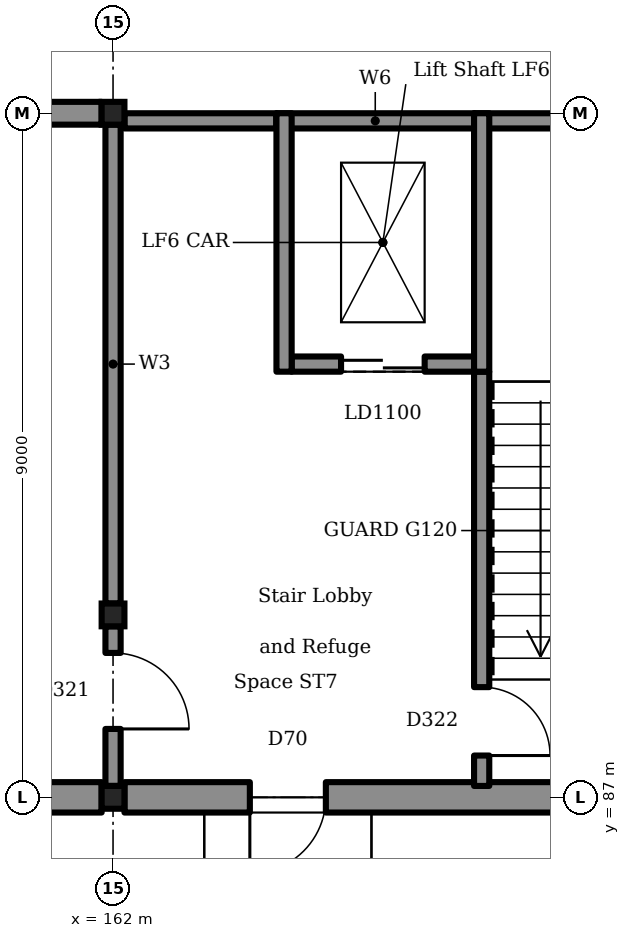
"""IFC4 building model, lengths in metres.
Left out: names, types, materials, properties, quantities, classifications, styles, units other than length and angle.
Written with IfcOpenShell. Run it as: python <this file> out.ifc"""

import sys

from ifc_helpers import new_model, si_unit, direction, frame, frame_2d, origin, origin_2d, place, context, subcontext, project, spatial, rectangle, i_section, extrude, element, fill, save


model = new_model("IFC4")
c1 = context("Model", 3, precision=1e-05, world=origin(), true_north=direction((0.0, 1.0)))
c2 = subcontext(c1, "Body", "Model", "MODEL_VIEW")
j1 = project(units=[si_unit("LENGTHUNIT", "METRE"), si_unit("PLANEANGLEUNIT", "RADIAN")], contexts=[c1])
p1 = place(None, origin())
s1 = spatial("IfcSite", under=j1, at=p1, CompositionType="ELEMENT")
p2 = place(p1, origin())
s2 = spatial("IfcBuilding", under=s1, at=p2, CompositionType="ELEMENT")
p3 = place(p2, origin())
s3 = spatial("IfcBuildingStorey", under=s2, at=p3, CompositionType="ELEMENT", Elevation=0.0)
for number, where, z_axis, x_axis in (
    (1, (162.0, 87.0, 0.0), (0.0, 0.0, 1.0), (1.0, 0.0, 0.0)),
    (2, (162.0, 96.0, 0.0), (0.0, 0.0, 1.0), (1.0, 0.0, 0.0)),
    (3, (162.0, 89.4, 0.0), (0.0, 0.0, 1.0), (1.0, 0.0, 0.0)),
):
    element("IfcColumn", number, at=place(p3, frame(where, z_axis=z_axis, x_axis=x_axis)), inside=s3, PredefinedType="COLUMN", context=c2, shape_type="SweptSolid", body=[
        extrude(i_section(OverallWidth=0.3, OverallDepth=0.3, WebThickness=0.011, FlangeThickness=0.019, FilletRadius=0.027, at=origin_2d()), origin(), (0.0, 0.0, 1.0), 5.4),
    ])
p4 = place(p3, frame((154.15, 87.0, 0.0), z_axis=(0.0, 0.0, 1.0), x_axis=(1.0, 0.0, 0.0)))
e4 = element("IfcWall", 4, at=p4, inside=s3, PredefinedType="SOLIDWALL", context=c2, shape_type="SweptSolid", body=[
    extrude(rectangle(XDim=7.7, YDim=0.4, at=frame_2d((3.85, 0.0))), origin(), (0.0, 0.0, 1.0), 5.15),
])
p5 = place(p3, frame((162.15, 87.0, 0.0), z_axis=(0.0, 0.0, 1.0), x_axis=(1.0, 0.0, 0.0)))
e5 = element("IfcWall", 5, at=p5, inside=s3, PredefinedType="SOLIDWALL", context=c2, shape_type="SweptSolid", body=[
    extrude(rectangle(XDim=7.7, YDim=0.4, at=frame_2d((3.85, 0.0))), origin(), (0.0, 0.0, 1.0), 5.15),
])
p6 = place(p5, frame((1.65, 0.0, 0.0)))
e6 = element("IfcOpeningElement", 6, at=p6, cuts=e5, PredefinedType="OPENING", context=c2, shape_type="SweptSolid", body=[
    extrude(rectangle(XDim=1.0, YDim=2.1, at=frame_2d((0.5, 1.05))), frame((0.0, 0.21, 0.0), z_axis=(0.0, -1.0, 0.0), x_axis=(1.0, 0.0, 0.0)), (0.0, 0.0, 1.0), 0.42),
])
p7 = place(p3, frame((160.0, 96.0, 0.0), z_axis=(0.0, 0.0, 1.0), x_axis=(1.0, 0.0, 0.0)))
e7 = element("IfcWall", 7, at=p7, inside=s3, PredefinedType="SOLIDWALL", context=c2, shape_type="SweptSolid", body=[
    extrude(rectangle(XDim=1.85, YDim=0.3, at=frame_2d((0.925, 0.0))), origin(), (0.0, 0.0, 1.0), 6.0),
])
p8 = place(p3, frame((162.0, 87.15, 0.0), z_axis=(0.0, 0.0, 1.0), x_axis=(0.0, 1.0, 0.0)))
e8 = element("IfcWall", 8, at=p8, inside=s3, PredefinedType="SOLIDWALL", context=c2, shape_type="SweptSolid", body=[
    extrude(rectangle(XDim=2.1, YDim=0.2, at=frame_2d((1.05, 0.0))), origin(), (0.0, 0.0, 1.0), 5.15),
])
p9 = place(p8, frame((0.75, 0.0, 0.0)))
e9 = element("IfcOpeningElement", 9, at=p9, cuts=e8, PredefinedType="OPENING", context=c2, shape_type="SweptSolid", body=[
    extrude(rectangle(XDim=1.0, YDim=2.1, at=frame_2d((0.5, 1.05))), frame((0.0, 0.11, 0.0), z_axis=(0.0, -1.0, 0.0), x_axis=(1.0, 0.0, 0.0)), (0.0, 0.0, 1.0), 0.22),
])
p10 = place(p3, frame((162.0, 89.55, 0.0), z_axis=(0.0, 0.0, 1.0), x_axis=(0.0, 1.0, 0.0)))
e10 = element("IfcWall", 10, at=p10, inside=s3, PredefinedType="SOLIDWALL", context=c2, shape_type="SweptSolid", body=[
    extrude(rectangle(XDim=6.3, YDim=0.2, at=frame_2d((3.15, 0.0))), origin(), (0.0, 0.0, 1.0), 5.15),
])
p11 = place(p3, frame((162.15, 95.9, 0.0), z_axis=(0.0, 0.0, 1.0), x_axis=(1.0, 0.0, 0.0)))
e11 = element("IfcWall", 11, at=p11, inside=s3, PredefinedType="SOLIDWALL", context=c2, shape_type="SweptSolid", body=[
    extrude(rectangle(XDim=2.0, YDim=0.2, at=frame_2d((1.0, 0.0))), origin(), (0.0, 0.0, 1.0), 5.15),
])
p12 = place(p3, frame((166.75, 95.9, 0.0), z_axis=(0.0, 0.0, 1.0), x_axis=(1.0, 0.0, 0.0)))
e12 = element("IfcWall", 12, at=p12, inside=s3, PredefinedType="SOLIDWALL", context=c2, shape_type="SweptSolid", body=[
    extrude(rectangle(XDim=3.1, YDim=0.2, at=frame_2d((1.55, 0.0))), origin(), (0.0, 0.0, 1.0), 5.15),
])
p13 = place(p3, frame((166.85, 87.15, 0.0), z_axis=(0.0, 0.0, 1.0), x_axis=(0.0, 1.0, 0.0)))
e13 = element("IfcWall", 13, at=p13, inside=s3, PredefinedType="SOLIDWALL", context=c2, shape_type="SweptSolid", body=[
    extrude(rectangle(XDim=5.45, YDim=0.2, at=frame_2d((2.725, 0.0))), origin(), (0.0, 0.0, 1.0), 5.15),
])
p14 = place(p13, frame((0.4, 0.0, 0.0)))
e14 = element("IfcOpeningElement", 14, at=p14, cuts=e13, PredefinedType="OPENING", context=c2, shape_type="SweptSolid", body=[
    extrude(rectangle(XDim=0.9, YDim=2.1, at=frame_2d((0.45, 1.05))), frame((0.0, 0.11, 0.0), z_axis=(0.0, -1.0, 0.0), x_axis=(1.0, 0.0, 0.0)), (0.0, 0.0, 1.0), 0.22),
])
p15 = place(p3, frame((164.15, 95.9, -1.1), z_axis=(0.0, 0.0, 1.0), x_axis=(1.0, 0.0, 0.0)))
e15 = element("IfcWall", 15, at=p15, inside=s3, PredefinedType="SOLIDWALL", context=c2, shape_type="SweptSolid", body=[
    extrude(rectangle(XDim=2.6, YDim=0.2, at=frame_2d((1.3, 0.0))), origin(), (0.0, 0.0, 1.0), 6.5),
])
p16 = place(p3, frame((164.35, 92.7, -1.1), z_axis=(0.0, 0.0, 1.0), x_axis=(1.0, 0.0, 0.0)))
e16 = element("IfcWall", 16, at=p16, inside=s3, PredefinedType="SOLIDWALL", context=c2, shape_type="SweptSolid", body=[
    extrude(rectangle(XDim=2.4, YDim=0.2, at=frame_2d((1.2, 0.0))), origin(), (0.0, 0.0, 1.0), 6.5),
])
p17 = place(p16, frame((0.65, 0.0, 1.1)))
e17 = element("IfcOpeningElement", 17, at=p17, cuts=e16, PredefinedType="OPENING", context=c2, shape_type="SweptSolid", body=[
    extrude(rectangle(XDim=1.1, YDim=2.1, at=frame_2d((0.55, 1.05))), frame((0.0, 0.11, 0.0), z_axis=(0.0, -1.0, 0.0), x_axis=(1.0, 0.0, 0.0)), (0.0, 0.0, 1.0), 0.22),
])
for number, where, z_axis, x_axis in (
    (18, (164.25, 92.6, -1.1), (0.0, 0.0, 1.0), (0.0, 1.0, 0.0)),
    (19, (166.85, 92.6, -1.1), (0.0, 0.0, 1.0), (0.0, 1.0, 0.0)),
):
    element("IfcWall", number, at=place(p3, frame(where, z_axis=z_axis, x_axis=x_axis)), inside=s3, PredefinedType="SOLIDWALL", context=c2, shape_type="SweptSolid", body=[
        extrude(rectangle(XDim=3.4, YDim=0.2, at=frame_2d((1.7, 0.0))), origin(), (0.0, 0.0, 1.0), 6.5),
    ])
p18 = place(p6, frame((1.0, 0.0, 0.0), z_axis=(0.0, 0.0, 1.0), x_axis=(-1.0, 0.0, 0.0)))
e20 = element("IfcDoor", 20, at=p18, inside=s3, OperationType="SINGLE_SWING_LEFT", PredefinedType="DOOR", context=c2, shape_type="SweptSolid", body=[
    extrude(rectangle(XDim=1.0, YDim=2.1, at=frame_2d((0.5, 1.05))), frame((0.0, 0.025, 0.0), z_axis=(0.0, -1.0, 0.0), x_axis=(1.0, 0.0, 0.0)), (0.0, 0.0, 1.0), 0.05),
])
fill(e6, e20)
p19 = place(p17, origin())
e21 = element("IfcDoor", 21, at=p19, inside=s3, OperationType="SLIDING_TO_LEFT", PredefinedType="DOOR", context=c2, shape_type="SweptSolid", body=[
    extrude(rectangle(XDim=1.1, YDim=2.1, at=frame_2d((0.55, 1.05))), frame((0.0, 0.025, 0.0), z_axis=(0.0, -1.0, 0.0), x_axis=(1.0, 0.0, 0.0)), (0.0, 0.0, 1.0), 0.05),
])
fill(e17, e21)
p20 = place(p9, frame((1.0, 0.0, 0.0), z_axis=(0.0, 0.0, 1.0), x_axis=(-1.0, 0.0, 0.0)))
e22 = element("IfcDoor", 22, at=p20, inside=s3, OperationType="SINGLE_SWING_LEFT", PredefinedType="DOOR", context=c2, shape_type="SweptSolid", body=[
    extrude(rectangle(XDim=1.0, YDim=2.1, at=frame_2d((0.5, 1.05))), frame((0.0, 0.025, 0.0), z_axis=(0.0, -1.0, 0.0), x_axis=(1.0, 0.0, 0.0)), (0.0, 0.0, 1.0), 0.05),
])
fill(e9, e22)
p21 = place(p14, frame((0.9, 0.0, 0.0), z_axis=(0.0, 0.0, 1.0), x_axis=(-1.0, 0.0, 0.0)))
e23 = element("IfcDoor", 23, at=p21, inside=s3, OperationType="SINGLE_SWING_LEFT", PredefinedType="DOOR", context=c2, shape_type="SweptSolid", body=[
    extrude(rectangle(XDim=0.9, YDim=2.1, at=frame_2d((0.45, 1.05))), frame((0.0, 0.025, 0.0), z_axis=(0.0, -1.0, 0.0), x_axis=(1.0, 0.0, 0.0)), (0.0, 0.0, 1.0), 0.05),
])
fill(e14, e23)
save(model, sys.argv[1])
